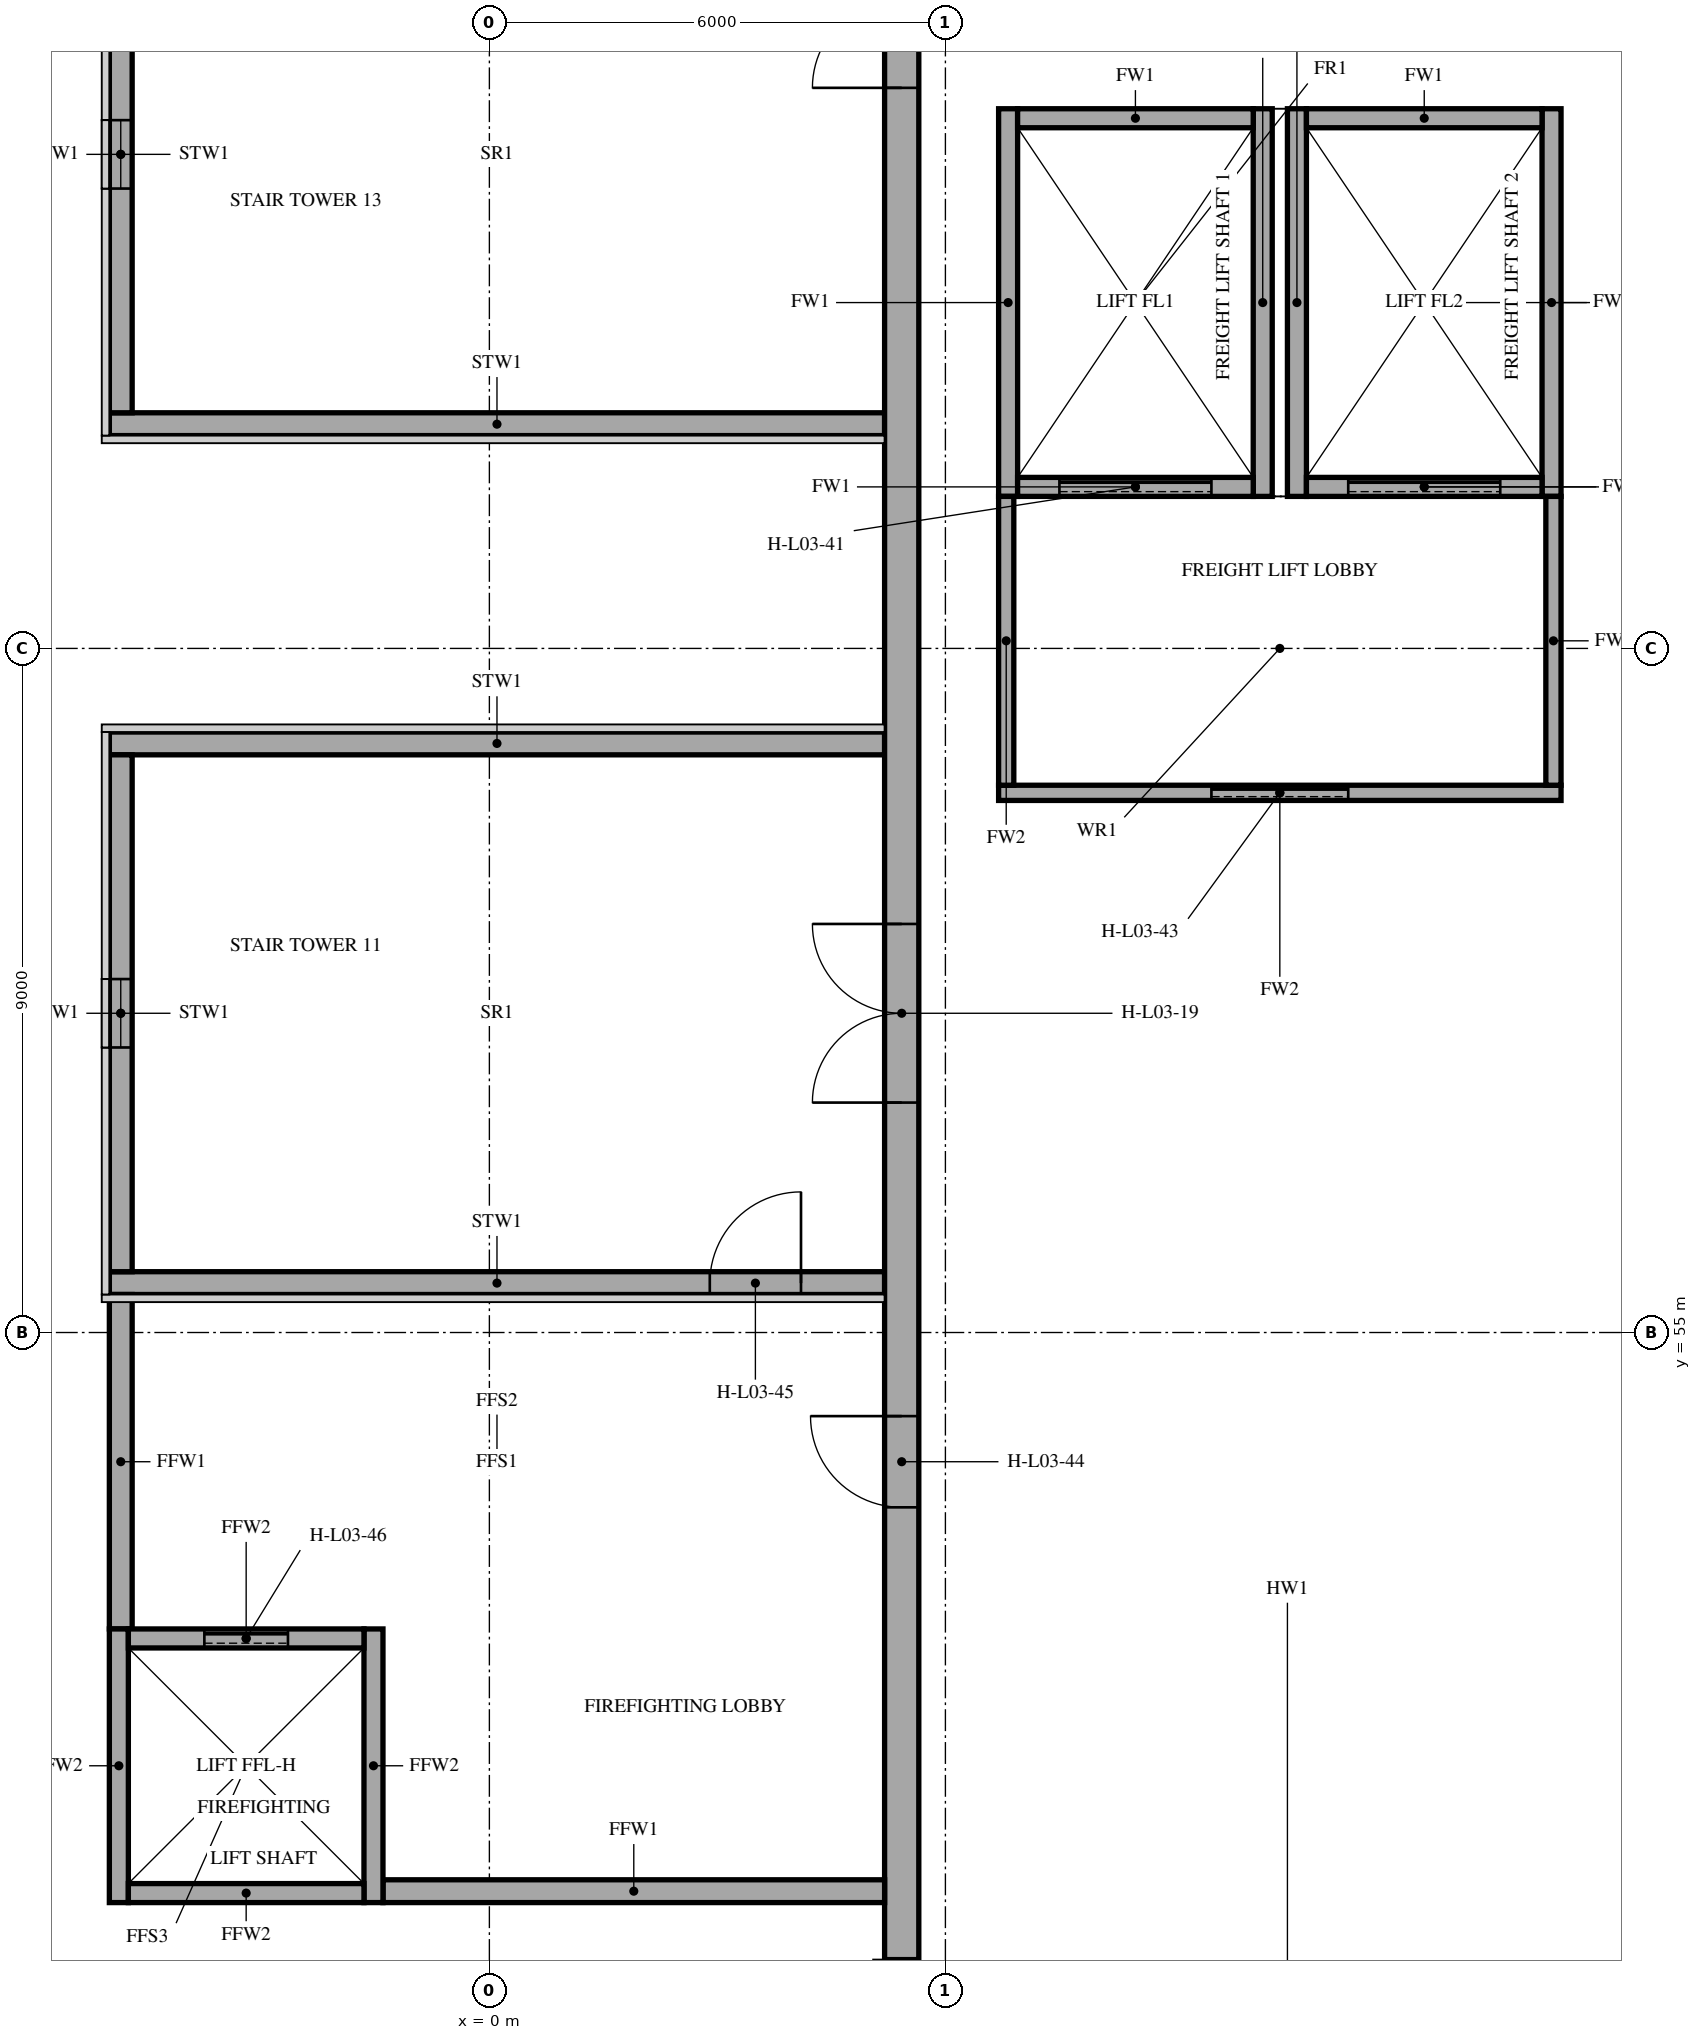
"""IFC4 building model, lengths in metres.
Left out: names, types, materials, properties, quantities, classifications, styles, units other than length and angle.
Written with IfcOpenShell. Run it as: python <this file> out.ifc"""

import sys

from ifc_helpers import new_model, si_unit, direction, frame, frame_2d, origin, place, context, subcontext, project, spatial, rectangle, extrude, element, fill, save


model = new_model("IFC4")
c1 = context("Model", 3, precision=1e-05, world=origin(), true_north=direction((0.0, 1.0)))
c2 = subcontext(c1, "Body", "Model", "MODEL_VIEW")
j1 = project(units=[si_unit("LENGTHUNIT", "METRE"), si_unit("PLANEANGLEUNIT", "RADIAN")], contexts=[c1])
p1 = place(None, origin())
s1 = spatial("IfcSite", under=j1, at=p1, CompositionType="ELEMENT")
p2 = place(p1, origin())
s2 = spatial("IfcBuilding", under=s1, at=p2, CompositionType="ELEMENT")
p3 = place(p2, frame((0.0, 0.0, 15.0)))
s3 = spatial("IfcBuildingStorey", under=s2, at=p3, CompositionType="ELEMENT", Elevation=15.0)
p4 = place(p3, frame((5.2, 55.65, 0.0), z_axis=(0.0, 0.0, 1.0), x_axis=(-1.0, 0.0, 0.0)))
e1 = element("IfcWall", 1, at=p4, inside=s3, PredefinedType="SHEAR", context=c2, shape_type="SweptSolid", body=[
    extrude(rectangle(XDim=10.2, YDim=0.3, at=frame_2d((5.1, 0.0))), origin(), (0.0, 0.0, 1.0), 3.9),
])
p5 = place(p4, frame((1.1, 0.0, 0.0)))
e2 = element("IfcOpeningElement", 2, at=p5, cuts=e1, PredefinedType="OPENING", context=c2, shape_type="SweptSolid", body=[
    extrude(rectangle(XDim=1.2, YDim=2.1, at=frame_2d((0.6, 1.05))), frame((0.0, 0.16, 0.0), z_axis=(0.0, -1.0, 0.0), x_axis=(1.0, 0.0, 0.0)), (0.0, 0.0, 1.0), 0.32),
])
p6 = place(p3, frame((5.2, 62.75, 0.0), z_axis=(0.0, 0.0, 1.0), x_axis=(-1.0, 0.0, 0.0)))
e3 = element("IfcWall", 3, at=p6, inside=s3, PredefinedType="SHEAR", context=c2, shape_type="SweptSolid", body=[
    extrude(rectangle(XDim=10.2, YDim=0.3, at=frame_2d((5.1, 0.0))), origin(), (0.0, 0.0, 1.0), 3.9),
])
p7 = place(p3, frame((-4.85, 55.8, 0.0), z_axis=(0.0, 0.0, 1.0), x_axis=(0.0, 1.0, 0.0)))
e4 = element("IfcWall", 4, at=p7, inside=s3, PredefinedType="SHEAR", context=c2, shape_type="SweptSolid", body=[
    extrude(rectangle(XDim=6.8, YDim=0.3, at=frame_2d((3.4, 0.0))), origin(), (0.0, 0.0, 1.0), 3.9),
])
p8 = place(p7, frame((2.95, 0.0, 1.0)))
e5 = element("IfcOpeningElement", 5, at=p8, cuts=e4, PredefinedType="OPENING", context=c2, shape_type="SweptSolid", body=[
    extrude(rectangle(XDim=0.9, YDim=1.5, at=frame_2d((0.45, 0.75))), frame((0.0, 0.16, 0.0), z_axis=(0.0, -1.0, 0.0), x_axis=(1.0, 0.0, 0.0)), (0.0, 0.0, 1.0), 0.32),
])
p9 = place(p3, frame((5.2, 66.95, 0.0), z_axis=(0.0, 0.0, 1.0), x_axis=(-1.0, 0.0, 0.0)))
e6 = element("IfcWall", 6, at=p9, inside=s3, PredefinedType="SHEAR", context=c2, shape_type="SweptSolid", body=[
    extrude(rectangle(XDim=10.2, YDim=0.3, at=frame_2d((5.1, 0.0))), origin(), (0.0, 0.0, 1.0), 3.9),
])
p10 = place(p3, frame((-4.85, 67.1, 0.0), z_axis=(0.0, 0.0, 1.0), x_axis=(0.0, 1.0, 0.0)))
e7 = element("IfcWall", 7, at=p10, inside=s3, PredefinedType="SHEAR", context=c2, shape_type="SweptSolid", body=[
    extrude(rectangle(XDim=6.8, YDim=0.3, at=frame_2d((3.4, 0.0))), origin(), (0.0, 0.0, 1.0), 3.9),
])
p11 = place(p10, frame((2.95, 0.0, 1.0)))
e8 = element("IfcOpeningElement", 8, at=p11, cuts=e7, PredefinedType="OPENING", context=c2, shape_type="SweptSolid", body=[
    extrude(rectangle(XDim=0.9, YDim=1.5, at=frame_2d((0.45, 0.75))), frame((0.0, 0.16, 0.0), z_axis=(0.0, -1.0, 0.0), x_axis=(1.0, 0.0, 0.0)), (0.0, 0.0, 1.0), 0.32),
])
p12 = place(p3, frame((5.425, 46.75, 0.0), z_axis=(0.0, 0.0, 1.0), x_axis=(0.0, 1.0, 0.0)))
e9 = element("IfcWall", 9, at=p12, inside=s3, PredefinedType="SOLIDWALL", context=c2, shape_type="SweptSolid", body=[
    extrude(rectangle(XDim=61.65, YDim=0.45, at=frame_2d((30.825, 0.0))), origin(), (0.0, 0.0, 1.0), 4.2),
])
p13 = place(p12, frame((11.275, 0.0, 0.0)))
e10 = element("IfcOpeningElement", 10, at=p13, cuts=e9, PredefinedType="OPENING", context=c2, shape_type="SweptSolid", body=[
    extrude(rectangle(XDim=2.35, YDim=2.1, at=frame_2d((1.175, 1.05))), frame((0.0, 0.235, 0.0), z_axis=(0.0, -1.0, 0.0), x_axis=(1.0, 0.0, 0.0)), (0.0, 0.0, 1.0), 0.47),
])
p14 = place(p12, frame((31.275, 0.0, 0.0)))
e11 = element("IfcOpeningElement", 11, at=p14, cuts=e9, PredefinedType="OPENING", context=c2, shape_type="SweptSolid", body=[
    extrude(rectangle(XDim=2.35, YDim=2.1, at=frame_2d((1.175, 1.05))), frame((0.0, 0.235, 0.0), z_axis=(0.0, -1.0, 0.0), x_axis=(1.0, 0.0, 0.0)), (0.0, 0.0, 1.0), 0.47),
])
p15 = place(p12, frame((24.625, 0.0, 0.0)))
e12 = element("IfcOpeningElement", 12, at=p15, cuts=e9, PredefinedType="OPENING", context=c2, shape_type="SweptSolid", body=[
    extrude(rectangle(XDim=2.35, YDim=2.1, at=frame_2d((1.175, 1.05))), frame((0.0, 0.235, 0.0), z_axis=(0.0, -1.0, 0.0), x_axis=(1.0, 0.0, 0.0)), (0.0, 0.0, 1.0), 0.47),
])
p16 = place(p12, frame((36.875, 0.0, 0.0)))
e13 = element("IfcOpeningElement", 13, at=p16, cuts=e9, PredefinedType="OPENING", context=c2, shape_type="SweptSolid", body=[
    extrude(rectangle(XDim=2.35, YDim=2.1, at=frame_2d((1.175, 1.05))), frame((0.0, 0.235, 0.0), z_axis=(0.0, -1.0, 0.0), x_axis=(1.0, 0.0, 0.0)), (0.0, 0.0, 1.0), 0.47),
])
p17 = place(p12, frame((5.95, 0.0, 0.0)))
e14 = element("IfcOpeningElement", 14, at=p17, cuts=e9, PredefinedType="OPENING", context=c2, shape_type="SweptSolid", body=[
    extrude(rectangle(XDim=1.2, YDim=2.1, at=frame_2d((0.6, 1.05))), frame((0.0, 0.235, 0.0), z_axis=(0.0, -1.0, 0.0), x_axis=(1.0, 0.0, 0.0)), (0.0, 0.0, 1.0), 0.47),
])
for number, where, z_axis, x_axis in (
    (15, (6.825, 66.0, 0.0), (0.0, 0.0, 1.0), (0.0, 1.0, 0.0)),
    (16, (10.175, 66.0, 0.0), (0.0, 0.0, 1.0), (0.0, 1.0, 0.0)),
):
    element("IfcWall", number, at=place(p3, frame(where, z_axis=z_axis, x_axis=x_axis)), inside=s3, PredefinedType="SHEAR", context=c2, shape_type="SweptSolid", body=[
        extrude(rectangle(XDim=5.1, YDim=0.25, at=frame_2d((2.55, 0.0))), origin(), (0.0, 0.0, 1.0), 3.9),
    ])
p18 = place(p3, frame((6.95, 66.125, 0.0), z_axis=(0.0, 0.0, 1.0), x_axis=(1.0, 0.0, 0.0)))
e17 = element("IfcWall", 17, at=p18, inside=s3, PredefinedType="SHEAR", context=c2, shape_type="SweptSolid", body=[
    extrude(rectangle(XDim=3.1, YDim=0.25, at=frame_2d((1.55, 0.0))), origin(), (0.0, 0.0, 1.0), 3.9),
])
p19 = place(p18, frame((0.55, 0.0, 0.0)))
e18 = element("IfcOpeningElement", 18, at=p19, cuts=e17, PredefinedType="OPENING", context=c2, shape_type="SweptSolid", body=[
    extrude(rectangle(XDim=2.0, YDim=2.4, at=frame_2d((1.0, 1.2))), frame((0.0, 0.135, 0.0), z_axis=(0.0, -1.0, 0.0), x_axis=(1.0, 0.0, 0.0)), (0.0, 0.0, 1.0), 0.27),
])
p20 = place(p3, frame((6.95, 70.975, 0.0), z_axis=(0.0, 0.0, 1.0), x_axis=(1.0, 0.0, 0.0)))
e19 = element("IfcWall", 19, at=p20, inside=s3, PredefinedType="SHEAR", context=c2, shape_type="SweptSolid", body=[
    extrude(rectangle(XDim=3.1, YDim=0.25, at=frame_2d((1.55, 0.0))), origin(), (0.0, 0.0, 1.0), 3.9),
])
for number, where, z_axis, x_axis in (
    (20, (10.625, 66.0, 0.0), (0.0, 0.0, 1.0), (0.0, 1.0, 0.0)),
    (21, (13.975, 66.0, 0.0), (0.0, 0.0, 1.0), (0.0, 1.0, 0.0)),
):
    element("IfcWall", number, at=place(p3, frame(where, z_axis=z_axis, x_axis=x_axis)), inside=s3, PredefinedType="SHEAR", context=c2, shape_type="SweptSolid", body=[
        extrude(rectangle(XDim=5.1, YDim=0.25, at=frame_2d((2.55, 0.0))), origin(), (0.0, 0.0, 1.0), 3.9),
    ])
p21 = place(p3, frame((10.75, 66.125, 0.0), z_axis=(0.0, 0.0, 1.0), x_axis=(1.0, 0.0, 0.0)))
e22 = element("IfcWall", 22, at=p21, inside=s3, PredefinedType="SHEAR", context=c2, shape_type="SweptSolid", body=[
    extrude(rectangle(XDim=3.1, YDim=0.25, at=frame_2d((1.55, 0.0))), origin(), (0.0, 0.0, 1.0), 3.9),
])
p22 = place(p21, frame((0.55, 0.0, 0.0)))
e23 = element("IfcOpeningElement", 23, at=p22, cuts=e22, PredefinedType="OPENING", context=c2, shape_type="SweptSolid", body=[
    extrude(rectangle(XDim=2.0, YDim=2.4, at=frame_2d((1.0, 1.2))), frame((0.0, 0.135, 0.0), z_axis=(0.0, -1.0, 0.0), x_axis=(1.0, 0.0, 0.0)), (0.0, 0.0, 1.0), 0.27),
])
p23 = place(p3, frame((10.75, 70.975, 0.0), z_axis=(0.0, 0.0, 1.0), x_axis=(1.0, 0.0, 0.0)))
e24 = element("IfcWall", 24, at=p23, inside=s3, PredefinedType="SHEAR", context=c2, shape_type="SweptSolid", body=[
    extrude(rectangle(XDim=3.1, YDim=0.25, at=frame_2d((1.55, 0.0))), origin(), (0.0, 0.0, 1.0), 3.9),
])
p24 = place(p3, frame((6.7, 62.1, 0.0), z_axis=(0.0, 0.0, 1.0), x_axis=(1.0, 0.0, 0.0)))
e25 = element("IfcWall", 25, at=p24, inside=s3, PredefinedType="SOLIDWALL", context=c2, shape_type="SweptSolid", body=[
    extrude(rectangle(XDim=7.4, YDim=0.2, at=frame_2d((3.7, 0.0))), origin(), (0.0, 0.0, 1.0), 3.7),
])
p25 = place(p24, frame((2.8, 0.0, 0.0)))
e26 = element("IfcOpeningElement", 26, at=p25, cuts=e25, PredefinedType="OPENING", context=c2, shape_type="SweptSolid", body=[
    extrude(rectangle(XDim=1.8, YDim=2.1, at=frame_2d((0.9, 1.05))), frame((0.0, 0.11, 0.0), z_axis=(0.0, -1.0, 0.0), x_axis=(1.0, 0.0, 0.0)), (0.0, 0.0, 1.0), 0.22),
])
for number, where, z_axis, x_axis in (
    (27, (6.8, 62.2, 0.0), (0.0, 0.0, 1.0), (0.0, 1.0, 0.0)),
    (28, (14.0, 62.2, 0.0), (0.0, 0.0, 1.0), (0.0, 1.0, 0.0)),
):
    element("IfcWall", number, at=place(p3, frame(where, z_axis=z_axis, x_axis=x_axis)), inside=s3, PredefinedType="SOLIDWALL", context=c2, shape_type="SweptSolid", body=[
        extrude(rectangle(XDim=3.8, YDim=0.2, at=frame_2d((1.9, 0.0))), origin(), (0.0, 0.0, 1.0), 3.7),
    ])
p26 = place(p3, frame((-4.85, 51.1, 0.0), z_axis=(0.0, 0.0, 1.0), x_axis=(0.0, 1.0, 0.0)))
e29 = element("IfcWall", 29, at=p26, inside=s3, PredefinedType="SHEAR", context=c2, shape_type="SweptSolid", body=[
    extrude(rectangle(XDim=4.4, YDim=0.3, at=frame_2d((2.2, 0.0))), origin(), (0.0, 0.0, 1.0), 3.7),
])
p27 = place(p3, frame((-1.4, 47.65, 0.0), z_axis=(0.0, 0.0, 1.0), x_axis=(1.0, 0.0, 0.0)))
e30 = element("IfcWall", 30, at=p27, inside=s3, PredefinedType="SHEAR", context=c2, shape_type="SweptSolid", body=[
    extrude(rectangle(XDim=6.6, YDim=0.3, at=frame_2d((3.3, 0.0))), origin(), (0.0, 0.0, 1.0), 3.7),
])
for number, where, z_axis, x_axis in (
    (31, (-4.875, 47.5, 0.0), (0.0, 0.0, 1.0), (0.0, 1.0, 0.0)),
    (32, (-1.525, 47.5, 0.0), (0.0, 0.0, 1.0), (0.0, 1.0, 0.0)),
):
    element("IfcWall", number, at=place(p3, frame(where, z_axis=z_axis, x_axis=x_axis)), inside=s3, PredefinedType="SHEAR", context=c2, shape_type="SweptSolid", body=[
        extrude(rectangle(XDim=3.6, YDim=0.25, at=frame_2d((1.8, 0.0))), origin(), (0.0, 0.0, 1.0), 3.9),
    ])
p28 = place(p3, frame((-4.75, 50.975, 0.0), z_axis=(0.0, 0.0, 1.0), x_axis=(1.0, 0.0, 0.0)))
e33 = element("IfcWall", 33, at=p28, inside=s3, PredefinedType="SHEAR", context=c2, shape_type="SweptSolid", body=[
    extrude(rectangle(XDim=3.1, YDim=0.25, at=frame_2d((1.55, 0.0))), origin(), (0.0, 0.0, 1.0), 3.9),
])
p29 = place(p28, frame((1.0, 0.0, 0.0)))
e34 = element("IfcOpeningElement", 34, at=p29, cuts=e33, PredefinedType="OPENING", context=c2, shape_type="SweptSolid", body=[
    extrude(rectangle(XDim=1.1, YDim=2.1, at=frame_2d((0.55, 1.05))), frame((0.0, 0.135, 0.0), z_axis=(0.0, -1.0, 0.0), x_axis=(1.0, 0.0, 0.0)), (0.0, 0.0, 1.0), 0.27),
])
p30 = place(p3, frame((-4.75, 47.625, 0.0), z_axis=(0.0, 0.0, 1.0), x_axis=(1.0, 0.0, 0.0)))
e35 = element("IfcWall", 35, at=p30, inside=s3, PredefinedType="SHEAR", context=c2, shape_type="SweptSolid", body=[
    extrude(rectangle(XDim=3.1, YDim=0.25, at=frame_2d((1.55, 0.0))), origin(), (0.0, 0.0, 1.0), 3.9),
])
p31 = place(p13, origin())
e36 = element("IfcDoor", 36, at=p31, inside=s3, OperationType="DOUBLE_DOOR_SINGLE_SWING", PredefinedType="DOOR", context=c2, shape_type="SweptSolid", body=[
    extrude(rectangle(XDim=2.35, YDim=2.1, at=frame_2d((1.175, 1.05))), frame((0.0, 0.025, 0.0), z_axis=(0.0, -1.0, 0.0), x_axis=(1.0, 0.0, 0.0)), (0.0, 0.0, 1.0), 0.05),
])
fill(e10, e36)
p32 = place(p15, origin())
e37 = element("IfcDoor", 37, at=p32, inside=s3, OperationType="DOUBLE_DOOR_SINGLE_SWING", PredefinedType="DOOR", context=c2, shape_type="SweptSolid", body=[
    extrude(rectangle(XDim=2.35, YDim=2.1, at=frame_2d((1.175, 1.05))), frame((0.0, 0.025, 0.0), z_axis=(0.0, -1.0, 0.0), x_axis=(1.0, 0.0, 0.0)), (0.0, 0.0, 1.0), 0.05),
])
fill(e12, e37)
p33 = place(p8, origin())
e38 = element("IfcWindow", 38, at=p33, inside=s3, PartitioningType="SINGLE_PANEL", PredefinedType="WINDOW", context=c2, shape_type="SweptSolid", body=[
    extrude(rectangle(XDim=0.9, YDim=1.5, at=frame_2d((0.45, 0.75))), frame((0.0, 0.03, 0.0), z_axis=(0.0, -1.0, 0.0), x_axis=(1.0, 0.0, 0.0)), (0.0, 0.0, 1.0), 0.06),
])
fill(e5, e38)
p34 = place(p11, origin())
e39 = element("IfcWindow", 39, at=p34, inside=s3, PartitioningType="SINGLE_PANEL", PredefinedType="WINDOW", context=c2, shape_type="SweptSolid", body=[
    extrude(rectangle(XDim=0.9, YDim=1.5, at=frame_2d((0.45, 0.75))), frame((0.0, 0.03, 0.0), z_axis=(0.0, -1.0, 0.0), x_axis=(1.0, 0.0, 0.0)), (0.0, 0.0, 1.0), 0.06),
])
fill(e8, e39)
p35 = place(p19, origin())
e40 = element("IfcDoor", 40, at=p35, inside=s3, OperationType="SLIDING_TO_LEFT", PredefinedType="DOOR", context=c2, shape_type="SweptSolid", body=[
    extrude(rectangle(XDim=2.0, YDim=2.4, at=frame_2d((1.0, 1.2))), frame((0.0, 0.025, 0.0), z_axis=(0.0, -1.0, 0.0), x_axis=(1.0, 0.0, 0.0)), (0.0, 0.0, 1.0), 0.05),
])
fill(e18, e40)
p36 = place(p22, origin())
e41 = element("IfcDoor", 41, at=p36, inside=s3, OperationType="SLIDING_TO_LEFT", PredefinedType="DOOR", context=c2, shape_type="SweptSolid", body=[
    extrude(rectangle(XDim=2.0, YDim=2.4, at=frame_2d((1.0, 1.2))), frame((0.0, 0.025, 0.0), z_axis=(0.0, -1.0, 0.0), x_axis=(1.0, 0.0, 0.0)), (0.0, 0.0, 1.0), 0.05),
])
fill(e23, e41)
p37 = place(p25, origin())
e42 = element("IfcDoor", 42, at=p37, inside=s3, OperationType="DOUBLE_DOOR_SINGLE_SWING", PredefinedType="DOOR", context=c2, shape_type="SweptSolid", body=[
    extrude(rectangle(XDim=1.8, YDim=2.1, at=frame_2d((0.9, 1.05))), frame((0.0, 0.025, 0.0), z_axis=(0.0, -1.0, 0.0), x_axis=(1.0, 0.0, 0.0)), (0.0, 0.0, 1.0), 0.05),
])
fill(e26, e42)
p38 = place(p17, origin())
e43 = element("IfcDoor", 43, at=p38, inside=s3, OperationType="SINGLE_SWING_RIGHT", PredefinedType="DOOR", context=c2, shape_type="SweptSolid", body=[
    extrude(rectangle(XDim=1.2, YDim=2.1, at=frame_2d((0.6, 1.05))), frame((0.0, 0.025, 0.0), z_axis=(0.0, -1.0, 0.0), x_axis=(1.0, 0.0, 0.0)), (0.0, 0.0, 1.0), 0.05),
])
fill(e14, e43)
p39 = place(p5, frame((1.2, 0.0, 0.0), z_axis=(0.0, 0.0, 1.0), x_axis=(-1.0, 0.0, 0.0)))
e44 = element("IfcDoor", 44, at=p39, inside=s3, OperationType="SINGLE_SWING_RIGHT", PredefinedType="DOOR", context=c2, shape_type="SweptSolid", body=[
    extrude(rectangle(XDim=1.2, YDim=2.1, at=frame_2d((0.6, 1.05))), frame((0.0, 0.025, 0.0), z_axis=(0.0, -1.0, 0.0), x_axis=(1.0, 0.0, 0.0)), (0.0, 0.0, 1.0), 0.05),
])
fill(e2, e44)
p40 = place(p29, origin())
e45 = element("IfcDoor", 45, at=p40, inside=s3, OperationType="SLIDING_TO_LEFT", PredefinedType="DOOR", context=c2, shape_type="SweptSolid", body=[
    extrude(rectangle(XDim=1.1, YDim=2.1, at=frame_2d((0.55, 1.05))), frame((0.0, 0.025, 0.0), z_axis=(0.0, -1.0, 0.0), x_axis=(1.0, 0.0, 0.0)), (0.0, 0.0, 1.0), 0.05),
])
fill(e34, e45)
save(model, sys.argv[1])
